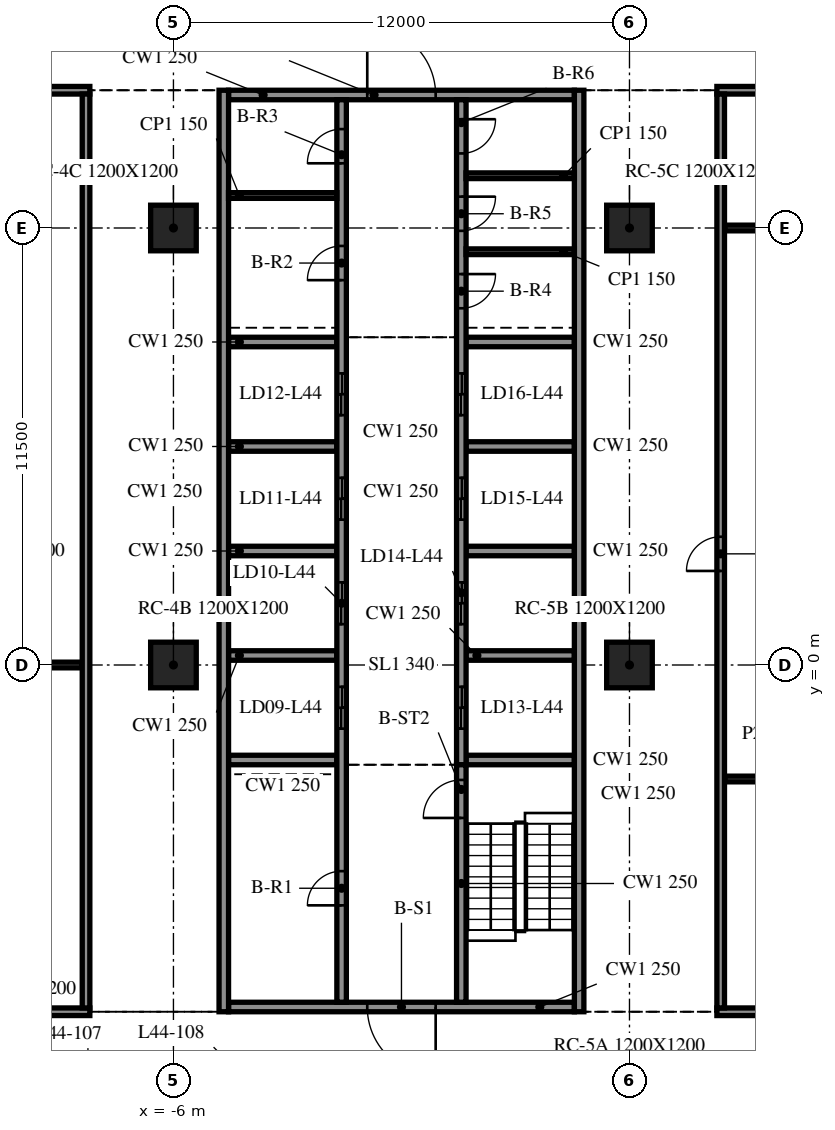
"""IFC4 building model, lengths in metres.
Left out: names, types, materials, properties, quantities, classifications, styles, units other than length and angle.
Written with IfcOpenShell. Run it as: python <this file> out.ifc"""

import sys

from ifc_helpers import new_model, si_unit, direction, frame, frame_2d, origin, origin_2d, place, context, subcontext, project, spatial, rectangle, extrude, element, fill, save


model = new_model("IFC4")
c1 = context("Model", 3, precision=1e-05, world=origin(), true_north=direction((0.0, 1.0)))
c2 = subcontext(c1, "Body", "Model", "MODEL_VIEW")
j1 = project(units=[si_unit("LENGTHUNIT", "METRE"), si_unit("PLANEANGLEUNIT", "RADIAN")], contexts=[c1])
p1 = place(None, origin())
s1 = spatial("IfcSite", under=j1, at=p1, CompositionType="ELEMENT")
p2 = place(p1, origin())
s2 = spatial("IfcBuilding", under=s1, at=p2, CompositionType="ELEMENT")
p3 = place(p2, frame((0.0, 0.0, 185.8)))
s3 = spatial("IfcBuildingStorey", under=s2, at=p3, CompositionType="ELEMENT", Elevation=185.8)
for number, where, z_axis, x_axis in (
    (1, (-6.0, 0.0, -0.34), (0.0, 0.0, 1.0), (1.0, 0.0, 0.0)),
    (2, (-6.0, 11.5, -0.34), (0.0, 0.0, 1.0), (1.0, 0.0, 0.0)),
    (3, (6.0, 0.0, -0.34), (0.0, 0.0, 1.0), (1.0, 0.0, 0.0)),
    (4, (6.0, 11.5, -0.34), (0.0, 0.0, 1.0), (1.0, 0.0, 0.0)),
):
    element("IfcColumn", number, at=place(p3, frame(where, z_axis=z_axis, x_axis=x_axis)), inside=s3, PredefinedType="COLUMN", context=c2, shape_type="SweptSolid", body=[
        extrude(rectangle(XDim=1.2, YDim=1.2, at=origin_2d()), origin(), (0.0, 0.0, 1.0), 3.74),
    ])
for number, where, z_axis, x_axis in (
    (5, (-4.675, 15.125, 0.0), (0.0, 0.0, 1.0), (0.0, -1.0, 0.0)),
    (6, (4.675, -9.125, 0.0), (0.0, 0.0, 1.0), (0.0, 1.0, 0.0)),
):
    element("IfcWall", number, at=place(p3, frame(where, z_axis=z_axis, x_axis=x_axis)), inside=s3, PredefinedType="SOLIDWALL", context=c2, shape_type="SweptSolid", body=[
        extrude(rectangle(XDim=24.25, YDim=0.25, at=frame_2d((12.125, 0.0))), origin(), (0.0, 0.0, 1.0), 3.4),
    ])
p4 = place(p3, frame((4.55, -9.0, 0.0), z_axis=(0.0, 0.0, 1.0), x_axis=(-1.0, 0.0, 0.0)))
e7 = element("IfcWall", 7, at=p4, inside=s3, PredefinedType="SOLIDWALL", context=c2, shape_type="SweptSolid", body=[
    extrude(rectangle(XDim=9.1, YDim=0.25, at=frame_2d((4.55, 0.0))), origin(), (0.0, 0.0, 1.0), 3.4),
])
p5 = place(p4, frame((3.65, 0.0, 0.0)))
e8 = element("IfcOpeningElement", 8, at=p5, cuts=e7, PredefinedType="OPENING", context=c2, shape_type="SweptSolid", body=[
    extrude(rectangle(XDim=1.8, YDim=2.1, at=frame_2d((0.9, 1.05))), frame((0.0, 0.135, 0.0), z_axis=(0.0, -1.0, 0.0), x_axis=(1.0, 0.0, 0.0)), (0.0, 0.0, 1.0), 0.27),
])
p6 = place(p3, frame((-4.55, 15.0, 0.0), z_axis=(0.0, 0.0, 1.0), x_axis=(1.0, 0.0, 0.0)))
e9 = element("IfcWall", 9, at=p6, inside=s3, PredefinedType="SOLIDWALL", context=c2, shape_type="SweptSolid", body=[
    extrude(rectangle(XDim=9.1, YDim=0.25, at=frame_2d((4.55, 0.0))), origin(), (0.0, 0.0, 1.0), 3.4),
])
p7 = place(p6, frame((3.65, 0.0, 0.0)))
e10 = element("IfcOpeningElement", 10, at=p7, cuts=e9, PredefinedType="OPENING", context=c2, shape_type="SweptSolid", body=[
    extrude(rectangle(XDim=1.8, YDim=2.1, at=frame_2d((0.9, 1.05))), frame((0.0, 0.135, 0.0), z_axis=(0.0, -1.0, 0.0), x_axis=(1.0, 0.0, 0.0)), (0.0, 0.0, 1.0), 0.27),
])
p8 = place(p3, frame((-1.575, -8.875, 0.0), z_axis=(0.0, 0.0, 1.0), x_axis=(0.0, 1.0, 0.0)))
e11 = element("IfcWall", 11, at=p8, inside=s3, PredefinedType="SOLIDWALL", context=c2, shape_type="SweptSolid", body=[
    extrude(rectangle(XDim=23.75, YDim=0.25, at=frame_2d((11.875, 0.0))), origin(), (0.0, 0.0, 1.0), 3.4),
])
p9 = place(p8, frame((7.2, 0.0, 0.0)))
e12 = element("IfcOpeningElement", 12, at=p9, cuts=e11, PredefinedType="OPENING", context=c2, shape_type="SweptSolid", body=[
    extrude(rectangle(XDim=1.1, YDim=2.1, at=frame_2d((0.55, 1.05))), frame((0.0, 0.135, 0.0), z_axis=(0.0, -1.0, 0.0), x_axis=(1.0, 0.0, 0.0)), (0.0, 0.0, 1.0), 0.27),
])
p10 = place(p8, frame((9.95, 0.0, 0.0)))
e13 = element("IfcOpeningElement", 13, at=p10, cuts=e11, PredefinedType="OPENING", context=c2, shape_type="SweptSolid", body=[
    extrude(rectangle(XDim=1.1, YDim=2.1, at=frame_2d((0.55, 1.05))), frame((0.0, 0.135, 0.0), z_axis=(0.0, -1.0, 0.0), x_axis=(1.0, 0.0, 0.0)), (0.0, 0.0, 1.0), 0.27),
])
p11 = place(p8, frame((12.7, 0.0, 0.0)))
e14 = element("IfcOpeningElement", 14, at=p11, cuts=e11, PredefinedType="OPENING", context=c2, shape_type="SweptSolid", body=[
    extrude(rectangle(XDim=1.1, YDim=2.1, at=frame_2d((0.55, 1.05))), frame((0.0, 0.135, 0.0), z_axis=(0.0, -1.0, 0.0), x_axis=(1.0, 0.0, 0.0)), (0.0, 0.0, 1.0), 0.27),
])
p12 = place(p8, frame((15.45, 0.0, 0.0)))
e15 = element("IfcOpeningElement", 15, at=p12, cuts=e11, PredefinedType="OPENING", context=c2, shape_type="SweptSolid", body=[
    extrude(rectangle(XDim=1.1, YDim=2.1, at=frame_2d((0.55, 1.05))), frame((0.0, 0.135, 0.0), z_axis=(0.0, -1.0, 0.0), x_axis=(1.0, 0.0, 0.0)), (0.0, 0.0, 1.0), 0.27),
])
p13 = place(p8, frame((2.55, 0.0, 0.0)))
e16 = element("IfcOpeningElement", 16, at=p13, cuts=e11, PredefinedType="OPENING", context=c2, shape_type="SweptSolid", body=[
    extrude(rectangle(XDim=0.9, YDim=2.1, at=frame_2d((0.45, 1.05))), frame((0.0, 0.135, 0.0), z_axis=(0.0, -1.0, 0.0), x_axis=(1.0, 0.0, 0.0)), (0.0, 0.0, 1.0), 0.27),
])
p14 = place(p8, frame((19.002, 0.0, 0.0)))
e17 = element("IfcOpeningElement", 17, at=p14, cuts=e11, PredefinedType="OPENING", context=c2, shape_type="SweptSolid", body=[
    extrude(rectangle(XDim=0.9, YDim=2.1, at=frame_2d((0.45, 1.05))), frame((0.0, 0.135, 0.0), z_axis=(0.0, -1.0, 0.0), x_axis=(1.0, 0.0, 0.0)), (0.0, 0.0, 1.0), 0.27),
])
p15 = place(p8, frame((22.077, 0.0, 0.0)))
e18 = element("IfcOpeningElement", 18, at=p15, cuts=e11, PredefinedType="OPENING", context=c2, shape_type="SweptSolid", body=[
    extrude(rectangle(XDim=0.9, YDim=2.1, at=frame_2d((0.45, 1.05))), frame((0.0, 0.135, 0.0), z_axis=(0.0, -1.0, 0.0), x_axis=(1.0, 0.0, 0.0)), (0.0, 0.0, 1.0), 0.27),
])
p16 = place(p3, frame((1.575, -8.875, 0.0), z_axis=(0.0, 0.0, 1.0), x_axis=(0.0, 1.0, 0.0)))
e19 = element("IfcWall", 19, at=p16, inside=s3, PredefinedType="SOLIDWALL", context=c2, shape_type="SweptSolid", body=[
    extrude(rectangle(XDim=6.25, YDim=0.25, at=frame_2d((3.125, 0.0))), origin(), (0.0, 0.0, 1.0), 3.4),
])
p17 = place(p16, frame((4.85, 0.0, 0.0)))
e20 = element("IfcOpeningElement", 20, at=p17, cuts=e19, PredefinedType="OPENING", context=c2, shape_type="SweptSolid", body=[
    extrude(rectangle(XDim=1.0, YDim=2.1, at=frame_2d((0.5, 1.05))), frame((0.0, 0.135, 0.0), z_axis=(0.0, -1.0, 0.0), x_axis=(1.0, 0.0, 0.0)), (0.0, 0.0, 1.0), 0.27),
])
p18 = place(p3, frame((1.575, 14.875, 0.0), z_axis=(0.0, 0.0, 1.0), x_axis=(0.0, -1.0, 0.0)))
e21 = element("IfcWall", 21, at=p18, inside=s3, PredefinedType="SOLIDWALL", context=c2, shape_type="SweptSolid", body=[
    extrude(rectangle(XDim=17.5, YDim=0.25, at=frame_2d((8.75, 0.0))), origin(), (0.0, 0.0, 1.0), 3.4),
])
p19 = place(p18, frame((15.45, 0.0, 0.0)))
e22 = element("IfcOpeningElement", 22, at=p19, cuts=e21, PredefinedType="OPENING", context=c2, shape_type="SweptSolid", body=[
    extrude(rectangle(XDim=1.1, YDim=2.1, at=frame_2d((0.55, 1.05))), frame((0.0, 0.135, 0.0), z_axis=(0.0, -1.0, 0.0), x_axis=(1.0, 0.0, 0.0)), (0.0, 0.0, 1.0), 0.27),
])
p20 = place(p18, frame((12.7, 0.0, 0.0)))
e23 = element("IfcOpeningElement", 23, at=p20, cuts=e21, PredefinedType="OPENING", context=c2, shape_type="SweptSolid", body=[
    extrude(rectangle(XDim=1.1, YDim=2.1, at=frame_2d((0.55, 1.05))), frame((0.0, 0.135, 0.0), z_axis=(0.0, -1.0, 0.0), x_axis=(1.0, 0.0, 0.0)), (0.0, 0.0, 1.0), 0.27),
])
p21 = place(p18, frame((9.95, 0.0, 0.0)))
e24 = element("IfcOpeningElement", 24, at=p21, cuts=e21, PredefinedType="OPENING", context=c2, shape_type="SweptSolid", body=[
    extrude(rectangle(XDim=1.1, YDim=2.1, at=frame_2d((0.55, 1.05))), frame((0.0, 0.135, 0.0), z_axis=(0.0, -1.0, 0.0), x_axis=(1.0, 0.0, 0.0)), (0.0, 0.0, 1.0), 0.27),
])
p22 = place(p18, frame((7.2, 0.0, 0.0)))
e25 = element("IfcOpeningElement", 25, at=p22, cuts=e21, PredefinedType="OPENING", context=c2, shape_type="SweptSolid", body=[
    extrude(rectangle(XDim=1.1, YDim=2.1, at=frame_2d((0.55, 1.05))), frame((0.0, 0.135, 0.0), z_axis=(0.0, -1.0, 0.0), x_axis=(1.0, 0.0, 0.0)), (0.0, 0.0, 1.0), 0.27),
])
p23 = place(p18, frame((4.587, 0.0, 0.0)))
e26 = element("IfcOpeningElement", 26, at=p23, cuts=e21, PredefinedType="OPENING", context=c2, shape_type="SweptSolid", body=[
    extrude(rectangle(XDim=0.9, YDim=2.1, at=frame_2d((0.45, 1.05))), frame((0.0, 0.135, 0.0), z_axis=(0.0, -1.0, 0.0), x_axis=(1.0, 0.0, 0.0)), (0.0, 0.0, 1.0), 0.27),
])
p24 = place(p18, frame((2.55, 0.0, 0.0)))
e27 = element("IfcOpeningElement", 27, at=p24, cuts=e21, PredefinedType="OPENING", context=c2, shape_type="SweptSolid", body=[
    extrude(rectangle(XDim=0.9, YDim=2.1, at=frame_2d((0.45, 1.05))), frame((0.0, 0.135, 0.0), z_axis=(0.0, -1.0, 0.0), x_axis=(1.0, 0.0, 0.0)), (0.0, 0.0, 1.0), 0.27),
])
p25 = place(p18, frame((0.512, 0.0, 0.0)))
e28 = element("IfcOpeningElement", 28, at=p25, cuts=e21, PredefinedType="OPENING", context=c2, shape_type="SweptSolid", body=[
    extrude(rectangle(XDim=0.9, YDim=2.1, at=frame_2d((0.45, 1.05))), frame((0.0, 0.135, 0.0), z_axis=(0.0, -1.0, 0.0), x_axis=(1.0, 0.0, 0.0)), (0.0, 0.0, 1.0), 0.27),
])
for number, where, z_axis, x_axis in (
    (29, (-4.55, -2.5, 0.0), (0.0, 0.0, 1.0), (1.0, 0.0, 0.0)),
    (30, (-4.55, 0.25, 0.0), (0.0, 0.0, 1.0), (1.0, 0.0, 0.0)),
    (31, (-4.55, 3.0, 0.0), (0.0, 0.0, 1.0), (1.0, 0.0, 0.0)),
    (32, (-4.55, 5.75, 0.0), (0.0, 0.0, 1.0), (1.0, 0.0, 0.0)),
    (33, (-4.55, 8.5, 0.0), (0.0, 0.0, 1.0), (1.0, 0.0, 0.0)),
    (34, (1.7, -2.5, 0.0), (0.0, 0.0, 1.0), (1.0, 0.0, 0.0)),
    (35, (1.7, 0.25, 0.0), (0.0, 0.0, 1.0), (1.0, 0.0, 0.0)),
    (36, (1.7, 3.0, 0.0), (0.0, 0.0, 1.0), (1.0, 0.0, 0.0)),
    (37, (1.7, 5.75, 0.0), (0.0, 0.0, 1.0), (1.0, 0.0, 0.0)),
    (38, (1.7, 8.5, 0.0), (0.0, 0.0, 1.0), (1.0, 0.0, 0.0)),
):
    element("IfcWall", number, at=place(p3, frame(where, z_axis=z_axis, x_axis=x_axis)), inside=s3, PredefinedType="SOLIDWALL", context=c2, shape_type="SweptSolid", body=[
        extrude(rectangle(XDim=2.85, YDim=0.25, at=frame_2d((1.425, 0.0))), origin(), (0.0, 0.0, 1.0), 3.4),
    ])
for number, where, z_axis, x_axis in (
    (39, (-4.55, 12.355, 0.0), (0.0, 0.0, 1.0), (1.0, 0.0, 0.0)),
    (40, (1.7, 10.875, 0.0), (0.0, 0.0, 1.0), (1.0, 0.0, 0.0)),
    (41, (1.7, 12.875, 0.0), (0.0, 0.0, 1.0), (1.0, 0.0, 0.0)),
):
    element("IfcWall", number, at=place(p3, frame(where, z_axis=z_axis, x_axis=x_axis)), inside=s3, PredefinedType="PARTITIONING", context=c2, shape_type="SweptSolid", body=[
        extrude(rectangle(XDim=2.85, YDim=0.15, at=frame_2d((1.425, 0.0))), origin(), (0.0, 0.0, 1.0), 3.4),
    ])
p26 = place(p3, frame((-15.9, -9.125, 0.0), z_axis=(0.0, 0.0, 1.0), x_axis=(1.0, 0.0, 0.0)))
e42 = element("IfcWall", 42, at=p26, inside=s3, PredefinedType="PARTITIONING", context=c2, shape_type="SweptSolid", body=[
    extrude(rectangle(XDim=7.7, YDim=0.2, at=frame_2d((3.85, 0.0))), origin(), (0.0, 0.0, 1.0), 3.4),
])
p27 = place(p26, frame((3.3, 0.0, 0.0)))
e43 = element("IfcOpeningElement", 43, at=p27, cuts=e42, PredefinedType="OPENING", context=c2, shape_type="SweptSolid", body=[
    extrude(rectangle(XDim=0.9, YDim=2.1, at=frame_2d((0.45, 1.05))), frame((0.0, 0.11, 0.0), z_axis=(0.0, -1.0, 0.0), x_axis=(1.0, 0.0, 0.0)), (0.0, 0.0, 1.0), 0.22),
])
p28 = place(p3, frame((8.3, -9.125, 0.0), z_axis=(0.0, 0.0, 1.0), x_axis=(1.0, 0.0, 0.0)))
e44 = element("IfcWall", 44, at=p28, inside=s3, PredefinedType="PARTITIONING", context=c2, shape_type="SweptSolid", body=[
    extrude(rectangle(XDim=7.3, YDim=0.2, at=frame_2d((3.65, 0.0))), origin(), (0.0, 0.0, 1.0), 3.4),
])
p29 = place(p28, frame((3.1, 0.0, 0.0)))
e45 = element("IfcOpeningElement", 45, at=p29, cuts=e44, PredefinedType="OPENING", context=c2, shape_type="SweptSolid", body=[
    extrude(rectangle(XDim=0.9, YDim=2.1, at=frame_2d((0.45, 1.05))), frame((0.0, 0.11, 0.0), z_axis=(0.0, -1.0, 0.0), x_axis=(1.0, 0.0, 0.0)), (0.0, 0.0, 1.0), 0.22),
])
p30 = place(p3, frame((8.5, -3.0, 0.0), z_axis=(0.0, 0.0, 1.0), x_axis=(1.0, 0.0, 0.0)))
e46 = element("IfcWall", 46, at=p30, inside=s3, PredefinedType="PARTITIONING", context=c2, shape_type="SweptSolid", body=[
    extrude(rectangle(XDim=6.9, YDim=0.15, at=frame_2d((3.45, 0.0))), origin(), (0.0, 0.0, 1.0), 3.4),
])
p31 = place(p3, frame((-15.7, 0.0, 0.0), z_axis=(0.0, 0.0, 1.0), x_axis=(1.0, 0.0, 0.0)))
e47 = element("IfcWall", 47, at=p31, inside=s3, PredefinedType="PARTITIONING", context=c2, shape_type="SweptSolid", body=[
    extrude(rectangle(XDim=7.3, YDim=0.15, at=frame_2d((3.65, 0.0))), origin(), (0.0, 0.0, 1.0), 3.4),
])
p32 = place(p3, frame((8.5, 11.5, 0.0), z_axis=(0.0, 0.0, 1.0), x_axis=(1.0, 0.0, 0.0)))
e48 = element("IfcWall", 48, at=p32, inside=s3, PredefinedType="PARTITIONING", context=c2, shape_type="SweptSolid", body=[
    extrude(rectangle(XDim=6.9, YDim=0.15, at=frame_2d((3.45, 0.0))), origin(), (0.0, 0.0, 1.0), 3.4),
])
p33 = place(p3, frame((-15.9, 15.125, 0.0), z_axis=(0.0, 0.0, 1.0), x_axis=(1.0, 0.0, 0.0)))
e49 = element("IfcWall", 49, at=p33, inside=s3, PredefinedType="PARTITIONING", context=c2, shape_type="SweptSolid", body=[
    extrude(rectangle(XDim=7.7, YDim=0.2, at=frame_2d((3.85, 0.0))), origin(), (0.0, 0.0, 1.0), 3.4),
])
p34 = place(p3, frame((8.3, 15.125, 0.0), z_axis=(0.0, 0.0, 1.0), x_axis=(1.0, 0.0, 0.0)))
e50 = element("IfcWall", 50, at=p34, inside=s3, PredefinedType="PARTITIONING", context=c2, shape_type="SweptSolid", body=[
    extrude(rectangle(XDim=7.3, YDim=0.2, at=frame_2d((3.65, 0.0))), origin(), (0.0, 0.0, 1.0), 3.4),
])
p35 = place(p34, frame((3.1, 0.0, 0.0)))
e51 = element("IfcOpeningElement", 51, at=p35, cuts=e50, PredefinedType="OPENING", context=c2, shape_type="SweptSolid", body=[
    extrude(rectangle(XDim=0.9, YDim=2.1, at=frame_2d((0.45, 1.05))), frame((0.0, 0.11, 0.0), z_axis=(0.0, -1.0, 0.0), x_axis=(1.0, 0.0, 0.0)), (0.0, 0.0, 1.0), 0.22),
])
p36 = place(p3, frame((-8.3, -9.025, 0.0), z_axis=(0.0, 0.0, 1.0), x_axis=(0.0, 1.0, 0.0)))
e52 = element("IfcWall", 52, at=p36, inside=s3, PredefinedType="PARTITIONING", context=c2, shape_type="SweptSolid", body=[
    extrude(rectangle(XDim=24.05, YDim=0.2, at=frame_2d((12.025, 0.0))), origin(), (0.0, 0.0, 1.0), 3.4),
])
p37 = place(p3, frame((8.4, -9.025, 0.0), z_axis=(0.0, 0.0, 1.0), x_axis=(0.0, 1.0, 0.0)))
e53 = element("IfcWall", 53, at=p37, inside=s3, PredefinedType="PARTITIONING", context=c2, shape_type="SweptSolid", body=[
    extrude(rectangle(XDim=24.05, YDim=0.2, at=frame_2d((12.025, 0.0))), origin(), (0.0, 0.0, 1.0), 3.4),
])
p38 = place(p37, frame((11.5, 0.0, 0.0)))
e54 = element("IfcOpeningElement", 54, at=p38, cuts=e53, PredefinedType="OPENING", context=c2, shape_type="SweptSolid", body=[
    extrude(rectangle(XDim=0.9, YDim=2.1, at=frame_2d((0.45, 1.05))), frame((0.0, 0.11, 0.0), z_axis=(0.0, -1.0, 0.0), x_axis=(1.0, 0.0, 0.0)), (0.0, 0.0, 1.0), 0.22),
])
p39 = place(p5, origin())
e55 = element("IfcDoor", 55, at=p39, inside=s3, OperationType="DOUBLE_DOOR_SINGLE_SWING", PredefinedType="DOOR", context=c2, shape_type="SweptSolid", body=[
    extrude(rectangle(XDim=1.8, YDim=2.1, at=frame_2d((0.9, 1.05))), frame((0.0, 0.025, 0.0), z_axis=(0.0, -1.0, 0.0), x_axis=(1.0, 0.0, 0.0)), (0.0, 0.0, 1.0), 0.05),
])
fill(e8, e55)
p40 = place(p7, origin())
e56 = element("IfcDoor", 56, at=p40, inside=s3, OperationType="DOUBLE_DOOR_SINGLE_SWING", PredefinedType="DOOR", context=c2, shape_type="SweptSolid", body=[
    extrude(rectangle(XDim=1.8, YDim=2.1, at=frame_2d((0.9, 1.05))), frame((0.0, 0.025, 0.0), z_axis=(0.0, -1.0, 0.0), x_axis=(1.0, 0.0, 0.0)), (0.0, 0.0, 1.0), 0.05),
])
fill(e10, e56)
p41 = place(p19, origin())
e57 = element("IfcDoor", 57, at=p41, inside=s3, OperationType="DOUBLE_DOOR_SLIDING", PredefinedType="DOOR", context=c2, shape_type="SweptSolid", body=[
    extrude(rectangle(XDim=1.1, YDim=2.1, at=frame_2d((0.55, 1.05))), frame((0.0, 0.025, 0.0), z_axis=(0.0, -1.0, 0.0), x_axis=(1.0, 0.0, 0.0)), (0.0, 0.0, 1.0), 0.05),
])
fill(e22, e57)
p42 = place(p20, origin())
e58 = element("IfcDoor", 58, at=p42, inside=s3, OperationType="DOUBLE_DOOR_SLIDING", PredefinedType="DOOR", context=c2, shape_type="SweptSolid", body=[
    extrude(rectangle(XDim=1.1, YDim=2.1, at=frame_2d((0.55, 1.05))), frame((0.0, 0.025, 0.0), z_axis=(0.0, -1.0, 0.0), x_axis=(1.0, 0.0, 0.0)), (0.0, 0.0, 1.0), 0.05),
])
fill(e23, e58)
p43 = place(p21, origin())
e59 = element("IfcDoor", 59, at=p43, inside=s3, OperationType="DOUBLE_DOOR_SLIDING", PredefinedType="DOOR", context=c2, shape_type="SweptSolid", body=[
    extrude(rectangle(XDim=1.1, YDim=2.1, at=frame_2d((0.55, 1.05))), frame((0.0, 0.025, 0.0), z_axis=(0.0, -1.0, 0.0), x_axis=(1.0, 0.0, 0.0)), (0.0, 0.0, 1.0), 0.05),
])
fill(e24, e59)
p44 = place(p22, origin())
e60 = element("IfcDoor", 60, at=p44, inside=s3, OperationType="DOUBLE_DOOR_SLIDING", PredefinedType="DOOR", context=c2, shape_type="SweptSolid", body=[
    extrude(rectangle(XDim=1.1, YDim=2.1, at=frame_2d((0.55, 1.05))), frame((0.0, 0.025, 0.0), z_axis=(0.0, -1.0, 0.0), x_axis=(1.0, 0.0, 0.0)), (0.0, 0.0, 1.0), 0.05),
])
fill(e25, e60)
p45 = place(p9, origin())
e61 = element("IfcDoor", 61, at=p45, inside=s3, OperationType="DOUBLE_DOOR_SLIDING", PredefinedType="DOOR", context=c2, shape_type="SweptSolid", body=[
    extrude(rectangle(XDim=1.1, YDim=2.1, at=frame_2d((0.55, 1.05))), frame((0.0, 0.025, 0.0), z_axis=(0.0, -1.0, 0.0), x_axis=(1.0, 0.0, 0.0)), (0.0, 0.0, 1.0), 0.05),
])
fill(e12, e61)
p46 = place(p10, origin())
e62 = element("IfcDoor", 62, at=p46, inside=s3, OperationType="DOUBLE_DOOR_SLIDING", PredefinedType="DOOR", context=c2, shape_type="SweptSolid", body=[
    extrude(rectangle(XDim=1.1, YDim=2.1, at=frame_2d((0.55, 1.05))), frame((0.0, 0.025, 0.0), z_axis=(0.0, -1.0, 0.0), x_axis=(1.0, 0.0, 0.0)), (0.0, 0.0, 1.0), 0.05),
])
fill(e13, e62)
p47 = place(p11, origin())
e63 = element("IfcDoor", 63, at=p47, inside=s3, OperationType="DOUBLE_DOOR_SLIDING", PredefinedType="DOOR", context=c2, shape_type="SweptSolid", body=[
    extrude(rectangle(XDim=1.1, YDim=2.1, at=frame_2d((0.55, 1.05))), frame((0.0, 0.025, 0.0), z_axis=(0.0, -1.0, 0.0), x_axis=(1.0, 0.0, 0.0)), (0.0, 0.0, 1.0), 0.05),
])
fill(e14, e63)
p48 = place(p12, origin())
e64 = element("IfcDoor", 64, at=p48, inside=s3, OperationType="DOUBLE_DOOR_SLIDING", PredefinedType="DOOR", context=c2, shape_type="SweptSolid", body=[
    extrude(rectangle(XDim=1.1, YDim=2.1, at=frame_2d((0.55, 1.05))), frame((0.0, 0.025, 0.0), z_axis=(0.0, -1.0, 0.0), x_axis=(1.0, 0.0, 0.0)), (0.0, 0.0, 1.0), 0.05),
])
fill(e15, e64)
p49 = place(p13, origin())
e65 = element("IfcDoor", 65, at=p49, inside=s3, OperationType="SINGLE_SWING_LEFT", PredefinedType="DOOR", context=c2, shape_type="SweptSolid", body=[
    extrude(rectangle(XDim=0.9, YDim=2.1, at=frame_2d((0.45, 1.05))), frame((0.0, 0.025, 0.0), z_axis=(0.0, -1.0, 0.0), x_axis=(1.0, 0.0, 0.0)), (0.0, 0.0, 1.0), 0.05),
])
fill(e16, e65)
p50 = place(p14, origin())
e66 = element("IfcDoor", 66, at=p50, inside=s3, OperationType="SINGLE_SWING_RIGHT", PredefinedType="DOOR", context=c2, shape_type="SweptSolid", body=[
    extrude(rectangle(XDim=0.9, YDim=2.1, at=frame_2d((0.45, 1.05))), frame((0.0, 0.025, 0.0), z_axis=(0.0, -1.0, 0.0), x_axis=(1.0, 0.0, 0.0)), (0.0, 0.0, 1.0), 0.05),
])
fill(e17, e66)
p51 = place(p15, origin())
e67 = element("IfcDoor", 67, at=p51, inside=s3, OperationType="SINGLE_SWING_LEFT", PredefinedType="DOOR", context=c2, shape_type="SweptSolid", body=[
    extrude(rectangle(XDim=0.9, YDim=2.1, at=frame_2d((0.45, 1.05))), frame((0.0, 0.025, 0.0), z_axis=(0.0, -1.0, 0.0), x_axis=(1.0, 0.0, 0.0)), (0.0, 0.0, 1.0), 0.05),
])
fill(e18, e67)
p52 = place(p23, origin())
e68 = element("IfcDoor", 68, at=p52, inside=s3, OperationType="SINGLE_SWING_RIGHT", PredefinedType="DOOR", context=c2, shape_type="SweptSolid", body=[
    extrude(rectangle(XDim=0.9, YDim=2.1, at=frame_2d((0.45, 1.05))), frame((0.0, 0.025, 0.0), z_axis=(0.0, -1.0, 0.0), x_axis=(1.0, 0.0, 0.0)), (0.0, 0.0, 1.0), 0.05),
])
fill(e26, e68)
p53 = place(p24, origin())
e69 = element("IfcDoor", 69, at=p53, inside=s3, OperationType="SINGLE_SWING_LEFT", PredefinedType="DOOR", context=c2, shape_type="SweptSolid", body=[
    extrude(rectangle(XDim=0.9, YDim=2.1, at=frame_2d((0.45, 1.05))), frame((0.0, 0.025, 0.0), z_axis=(0.0, -1.0, 0.0), x_axis=(1.0, 0.0, 0.0)), (0.0, 0.0, 1.0), 0.05),
])
fill(e27, e69)
p54 = place(p25, origin())
e70 = element("IfcDoor", 70, at=p54, inside=s3, OperationType="SINGLE_SWING_RIGHT", PredefinedType="DOOR", context=c2, shape_type="SweptSolid", body=[
    extrude(rectangle(XDim=0.9, YDim=2.1, at=frame_2d((0.45, 1.05))), frame((0.0, 0.025, 0.0), z_axis=(0.0, -1.0, 0.0), x_axis=(1.0, 0.0, 0.0)), (0.0, 0.0, 1.0), 0.05),
])
fill(e28, e70)
p55 = place(p17, origin())
e71 = element("IfcDoor", 71, at=p55, inside=s3, OperationType="SINGLE_SWING_LEFT", PredefinedType="DOOR", context=c2, shape_type="SweptSolid", body=[
    extrude(rectangle(XDim=1.0, YDim=2.1, at=frame_2d((0.5, 1.05))), frame((0.0, 0.025, 0.0), z_axis=(0.0, -1.0, 0.0), x_axis=(1.0, 0.0, 0.0)), (0.0, 0.0, 1.0), 0.05),
])
fill(e20, e71)
p56 = place(p38, origin())
e72 = element("IfcDoor", 72, at=p56, inside=s3, OperationType="SINGLE_SWING_RIGHT", PredefinedType="DOOR", context=c2, shape_type="SweptSolid", body=[
    extrude(rectangle(XDim=0.9, YDim=2.1, at=frame_2d((0.45, 1.05))), frame((0.0, 0.025, 0.0), z_axis=(0.0, -1.0, 0.0), x_axis=(1.0, 0.0, 0.0)), (0.0, 0.0, 1.0), 0.05),
])
fill(e54, e72)
save(model, sys.argv[1])
